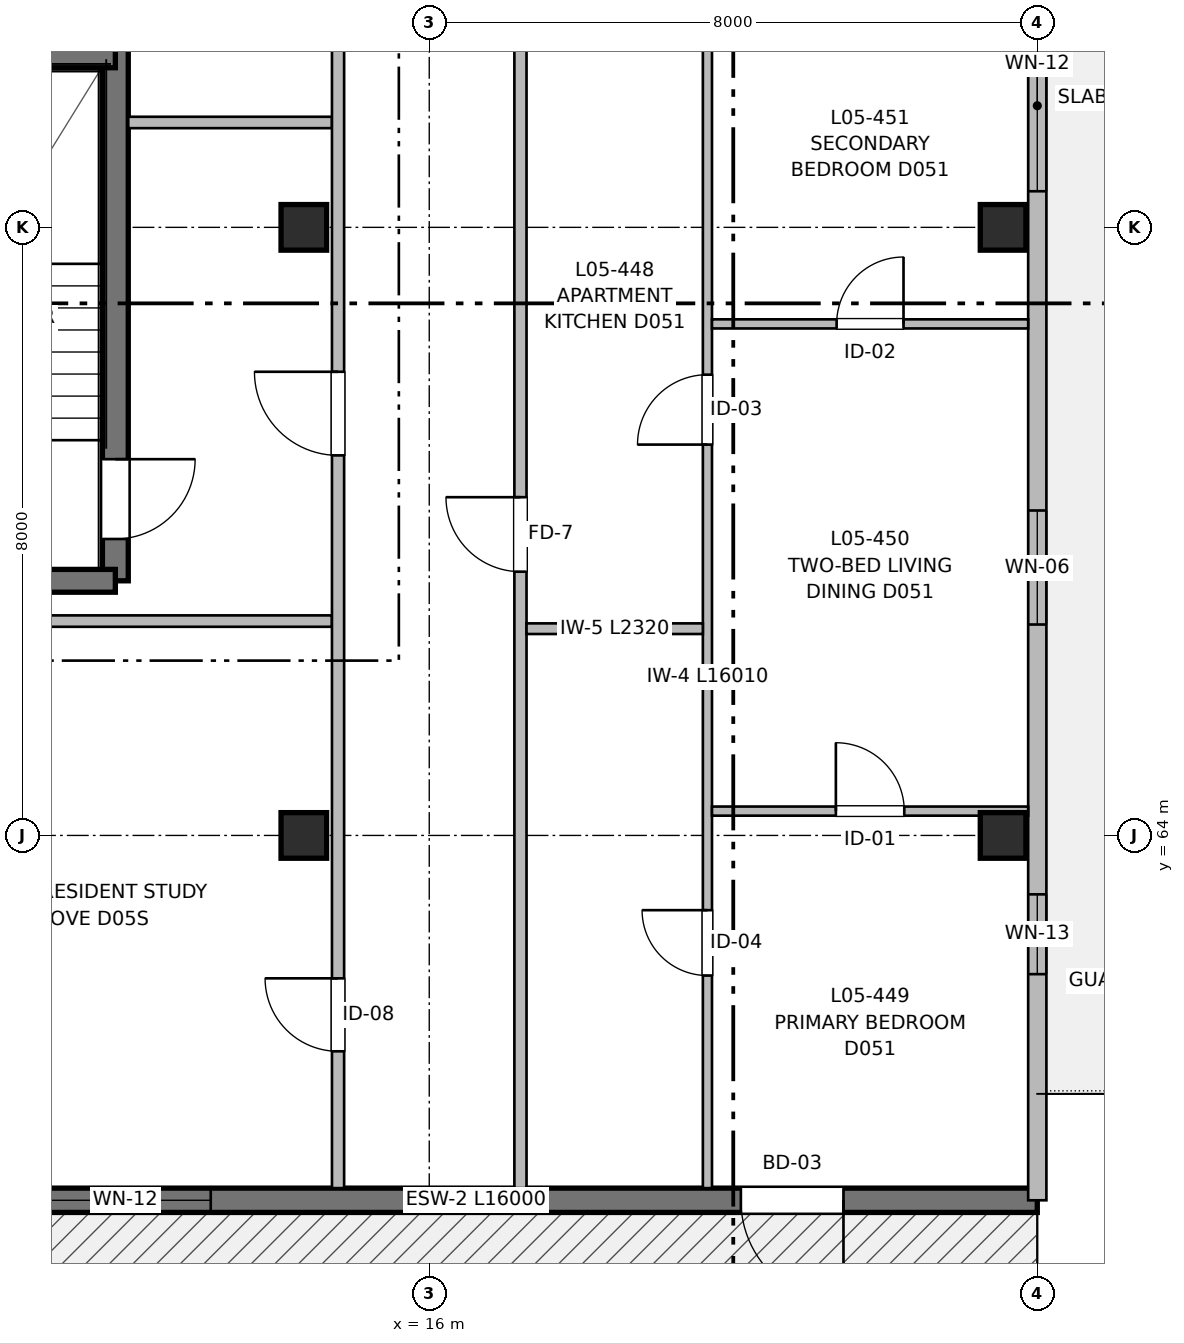
"""IFC4 building model, lengths in metres.
Left out: names, types, materials, properties, quantities, classifications, styles, units other than length and angle.
Written with IfcOpenShell. Run it as: python <this file> out.ifc"""

import sys

from ifc_helpers import new_model, si_unit, direction, frame, frame_2d, origin, origin_2d, place, context, subcontext, project, spatial, rectangle, extrude, element, fill, save


model = new_model("IFC4")
c1 = context("Model", 3, precision=1e-05, world=origin(), true_north=direction((0.0, 1.0)))
c2 = subcontext(c1, "Body", "Model", "MODEL_VIEW")
j1 = project(units=[si_unit("LENGTHUNIT", "METRE"), si_unit("PLANEANGLEUNIT", "RADIAN")], contexts=[c1])
p1 = place(None, origin())
s1 = spatial("IfcSite", under=j1, at=p1, CompositionType="ELEMENT")
p2 = place(p1, origin())
s2 = spatial("IfcBuilding", under=s1, at=p2, CompositionType="ELEMENT")
p3 = place(p2, frame((0.0, 0.0, 16.96)))
s3 = spatial("IfcBuildingStorey", under=s2, at=p3, CompositionType="ELEMENT", Elevation=16.96)
for number, where, z_axis, x_axis in (
    (1, (14.35, 64.0, 0.0), (0.0, 0.0, 1.0), (1.0, 0.0, 0.0)),
    (2, (14.35, 72.0, 0.0), (0.0, 0.0, 1.0), (1.0, 0.0, 0.0)),
    (3, (23.55, 64.0, 0.0), (0.0, 0.0, 1.0), (1.0, 0.0, 0.0)),
    (4, (23.55, 72.0, 0.0), (0.0, 0.0, 1.0), (1.0, 0.0, 0.0)),
):
    element("IfcColumn", number, at=place(p3, frame(where, z_axis=z_axis, x_axis=x_axis)), inside=s3, PredefinedType="COLUMN", context=c2, shape_type="SweptSolid", body=[
        extrude(rectangle(XDim=0.6, YDim=0.6, at=origin_2d()), origin(), (0.0, 0.0, 1.0), 3.2),
    ])
p4 = place(p3, frame((11.87, 79.8, 0.0), z_axis=(0.0, 0.0, 1.0), x_axis=(0.0, -1.0, 0.0)))
e5 = element("IfcWall", 5, at=p4, inside=s3, PredefinedType="SHEAR", context=c2, shape_type="SweptSolid", body=[
    extrude(rectangle(XDim=12.45, YDim=0.34, at=frame_2d((6.225, 0.0))), origin(), (0.0, 0.0, 1.0), 3.2),
])
p5 = place(p4, frame((10.85, 0.0, 0.0)))
e6 = element("IfcOpeningElement", 6, at=p5, cuts=e5, PredefinedType="OPENING", context=c2, shape_type="SweptSolid", body=[
    extrude(rectangle(XDim=1.05, YDim=2.15, at=frame_2d((0.525, 1.075))), frame((0.0, 0.18, 0.0), z_axis=(0.0, -1.0, 0.0), x_axis=(1.0, 0.0, 0.0)), (0.0, 0.0, 1.0), 0.36),
])
p6 = place(p3, frame((11.87, 67.35, 0.0), z_axis=(0.0, 0.0, 1.0), x_axis=(-1.0, 0.0, 0.0)))
e7 = element("IfcWall", 7, at=p6, inside=s3, PredefinedType="SHEAR", context=c2, shape_type="SweptSolid", body=[
    extrude(rectangle(XDim=3.41, YDim=0.3, at=frame_2d((1.705, 0.0))), origin(), (0.0, 0.0, 1.0), 3.2),
])
p7 = place(p3, frame((8.46, 74.24, 0.0), z_axis=(0.0, 0.0, 1.0), x_axis=(1.0, 0.0, 0.0)))
e8 = element("IfcWall", 8, at=p7, inside=s3, PredefinedType="SHEAR", context=c2, shape_type="SweptSolid", body=[
    extrude(rectangle(XDim=3.41, YDim=0.28, at=frame_2d((1.705, 0.0))), origin(), (0.0, 0.0, 1.0), 3.2),
])
p8 = place(p3, frame((24.0, 59.2, 0.0), z_axis=(0.0, 0.0, 1.0), x_axis=(-1.0, 0.0, 0.0)))
e9 = element("IfcWall", 9, at=p8, inside=s3, PredefinedType="SHEAR", context=c2, shape_type="SweptSolid", body=[
    extrude(rectangle(XDim=16.0, YDim=0.32, at=frame_2d((8.0, 0.0))), origin(), (0.0, 0.0, 1.0), 2.98),
])
p9 = place(p8, frame((2.55, 0.0, 0.0)))
e10 = element("IfcOpeningElement", 10, at=p9, cuts=e9, PredefinedType="OPENING", context=c2, shape_type="SweptSolid", body=[
    extrude(rectangle(XDim=1.35, YDim=2.2, at=frame_2d((0.675, 1.1))), frame((0.0, 0.17, 0.0), z_axis=(0.0, -1.0, 0.0), x_axis=(1.0, 0.0, 0.0)), (0.0, 0.0, 1.0), 0.34),
])
p10 = place(p8, frame((10.875, 0.0, 0.72)))
e11 = element("IfcOpeningElement", 11, at=p10, cuts=e9, PredefinedType="OPENING", context=c2, shape_type="SweptSolid", body=[
    extrude(rectangle(XDim=2.25, YDim=1.5, at=frame_2d((1.125, 0.75))), frame((0.0, 0.17, 0.0), z_axis=(0.0, -1.0, 0.0), x_axis=(1.0, 0.0, 0.0)), (0.0, 0.0, 1.0), 0.34),
])
p11 = place(p3, frame((24.0, 88.0, 0.0), z_axis=(0.0, 0.0, 1.0), x_axis=(0.0, -1.0, 0.0)))
e12 = element("IfcWall", 12, at=p11, inside=s3, PredefinedType="SOLIDWALL", context=c2, shape_type="SweptSolid", body=[
    extrude(rectangle(XDim=28.8, YDim=0.24, at=frame_2d((14.4, 0.0))), origin(), (0.0, 0.0, 1.0), 2.98),
])
p12 = place(p11, frame((4.2, 0.0, 0.0)))
e13 = element("IfcOpeningElement", 13, at=p12, cuts=e12, PredefinedType="OPENING", context=c2, shape_type="SweptSolid", body=[
    extrude(rectangle(XDim=1.2, YDim=2.2, at=frame_2d((0.6, 1.1))), frame((0.0, 0.13, 0.0), z_axis=(0.0, -1.0, 0.0), x_axis=(1.0, 0.0, 0.0)), (0.0, 0.0, 1.0), 0.26),
])
p13 = place(p11, frame((6.1, 0.0, 0.62)))
e14 = element("IfcOpeningElement", 14, at=p13, cuts=e12, PredefinedType="OPENING", context=c2, shape_type="SweptSolid", body=[
    extrude(rectangle(XDim=1.1, YDim=1.6, at=frame_2d((0.55, 0.8))), frame((0.0, 0.13, 0.0), z_axis=(0.0, -1.0, 0.0), x_axis=(1.0, 0.0, 0.0)), (0.0, 0.0, 1.0), 0.26),
])
p14 = place(p11, frame((13.275, 0.0, 0.72)))
e15 = element("IfcOpeningElement", 15, at=p14, cuts=e12, PredefinedType="OPENING", context=c2, shape_type="SweptSolid", body=[
    extrude(rectangle(XDim=2.25, YDim=1.5, at=frame_2d((1.125, 0.75))), frame((0.0, 0.13, 0.0), z_axis=(0.0, -1.0, 0.0), x_axis=(1.0, 0.0, 0.0)), (0.0, 0.0, 1.0), 0.26),
])
p15 = place(p11, frame((24.775, 0.0, 0.9)))
e16 = element("IfcOpeningElement", 16, at=p15, cuts=e12, PredefinedType="OPENING", context=c2, shape_type="SweptSolid", body=[
    extrude(rectangle(XDim=1.05, YDim=1.15, at=frame_2d((0.525, 0.575))), frame((0.0, 0.13, 0.0), z_axis=(0.0, -1.0, 0.0), x_axis=(1.0, 0.0, 0.0)), (0.0, 0.0, 1.0), 0.26),
])
p16 = place(p11, frame((19.725, 0.0, 0.82)))
e17 = element("IfcOpeningElement", 17, at=p16, cuts=e12, PredefinedType="OPENING", context=c2, shape_type="SweptSolid", body=[
    extrude(rectangle(XDim=1.5, YDim=1.4, at=frame_2d((0.75, 0.7))), frame((0.0, 0.13, 0.0), z_axis=(0.0, -1.0, 0.0), x_axis=(1.0, 0.0, 0.0)), (0.0, 0.0, 1.0), 0.26),
])
p17 = place(p11, frame((9.255, 0.0, 0.82)))
e18 = element("IfcOpeningElement", 18, at=p17, cuts=e12, PredefinedType="OPENING", context=c2, shape_type="SweptSolid", body=[
    extrude(rectangle(XDim=1.5, YDim=1.4, at=frame_2d((0.75, 0.7))), frame((0.0, 0.13, 0.0), z_axis=(0.0, -1.0, 0.0), x_axis=(1.0, 0.0, 0.0)), (0.0, 0.0, 1.0), 0.26),
])
p18 = place(p3, frame((8.12, 66.82, 0.0), z_axis=(0.0, 0.0, 1.0), x_axis=(1.0, 0.0, 0.0)))
e19 = element("IfcWall", 19, at=p18, inside=s3, PredefinedType="PARTITIONING", context=c2, shape_type="SweptSolid", body=[
    extrude(rectangle(XDim=6.6, YDim=0.15, at=frame_2d((3.3, 0.0))), origin(), (0.0, 0.0, 1.0), 2.935),
])
p19 = place(p3, frame((12.04, 73.38, 0.0), z_axis=(0.0, 0.0, 1.0), x_axis=(1.0, 0.0, 0.0)))
e20 = element("IfcWall", 20, at=p19, inside=s3, PredefinedType="PARTITIONING", context=c2, shape_type="SweptSolid", body=[
    extrude(rectangle(XDim=2.68, YDim=0.15, at=frame_2d((1.34, 0.0))), origin(), (0.0, 0.0, 1.0), 2.935),
])
p20 = place(p3, frame((14.8, 59.36, 0.0), z_axis=(0.0, 0.0, 1.0), x_axis=(0.0, 1.0, 0.0)))
e21 = element("IfcWall", 21, at=p20, inside=s3, PredefinedType="PARTITIONING", context=c2, shape_type="SweptSolid", body=[
    extrude(rectangle(XDim=47.44, YDim=0.16, at=frame_2d((23.72, 0.0))), origin(), (0.0, 0.0, 1.0), 2.935),
])
p21 = place(p20, frame((9.64, 0.0, 0.0)))
e22 = element("IfcOpeningElement", 22, at=p21, cuts=e21, PredefinedType="OPENING", context=c2, shape_type="SweptSolid", body=[
    extrude(rectangle(XDim=1.1, YDim=2.15, at=frame_2d((0.55, 1.075))), frame((0.0, 0.09, 0.0), z_axis=(0.0, -1.0, 0.0), x_axis=(1.0, 0.0, 0.0)), (0.0, 0.0, 1.0), 0.18),
])
p22 = place(p20, frame((16.04, 0.0, 0.0)))
e23 = element("IfcOpeningElement", 23, at=p22, cuts=e21, PredefinedType="OPENING", context=c2, shape_type="SweptSolid", body=[
    extrude(rectangle(XDim=1.6, YDim=2.15, at=frame_2d((0.8, 1.075))), frame((0.0, 0.09, 0.0), z_axis=(0.0, -1.0, 0.0), x_axis=(1.0, 0.0, 0.0)), (0.0, 0.0, 1.0), 0.18),
])
p23 = place(p20, frame((1.8, 0.0, 0.0)))
e24 = element("IfcOpeningElement", 24, at=p23, cuts=e21, PredefinedType="OPENING", context=c2, shape_type="SweptSolid", body=[
    extrude(rectangle(XDim=0.96, YDim=2.15, at=frame_2d((0.48, 1.075))), frame((0.0, 0.09, 0.0), z_axis=(0.0, -1.0, 0.0), x_axis=(1.0, 0.0, 0.0)), (0.0, 0.0, 1.0), 0.18),
])
p24 = place(p20, frame((29.445, 0.0, 0.0)))
e25 = element("IfcOpeningElement", 25, at=p24, cuts=e21, PredefinedType="OPENING", context=c2, shape_type="SweptSolid", body=[
    extrude(rectangle(XDim=0.98, YDim=2.15, at=frame_2d((0.49, 1.075))), frame((0.0, 0.09, 0.0), z_axis=(0.0, -1.0, 0.0), x_axis=(1.0, 0.0, 0.0)), (0.0, 0.0, 1.0), 0.18),
])
p25 = place(p20, frame((38.055, 0.0, 0.0)))
e26 = element("IfcOpeningElement", 26, at=p25, cuts=e21, PredefinedType="OPENING", context=c2, shape_type="SweptSolid", body=[
    extrude(rectangle(XDim=0.98, YDim=2.15, at=frame_2d((0.49, 1.075))), frame((0.0, 0.09, 0.0), z_axis=(0.0, -1.0, 0.0), x_axis=(1.0, 0.0, 0.0)), (0.0, 0.0, 1.0), 0.18),
])
p26 = place(p3, frame((17.2, 59.36, 0.0), z_axis=(0.0, 0.0, 1.0), x_axis=(0.0, 1.0, 0.0)))
e27 = element("IfcWall", 27, at=p26, inside=s3, PredefinedType="PARTITIONING", context=c2, shape_type="SweptSolid", body=[
    extrude(rectangle(XDim=47.44, YDim=0.16, at=frame_2d((23.72, 0.0))), origin(), (0.0, 0.0, 1.0), 2.935),
])
p27 = place(p26, frame((8.11, 0.0, 0.0)))
e28 = element("IfcOpeningElement", 28, at=p27, cuts=e27, PredefinedType="OPENING", context=c2, shape_type="SweptSolid", body=[
    extrude(rectangle(XDim=0.98, YDim=2.15, at=frame_2d((0.49, 1.075))), frame((0.0, 0.09, 0.0), z_axis=(0.0, -1.0, 0.0), x_axis=(1.0, 0.0, 0.0)), (0.0, 0.0, 1.0), 0.18),
])
p28 = place(p26, frame((24.26, 0.0, 0.0)))
e29 = element("IfcOpeningElement", 29, at=p28, cuts=e27, PredefinedType="OPENING", context=c2, shape_type="SweptSolid", body=[
    extrude(rectangle(XDim=1.02, YDim=2.15, at=frame_2d((0.51, 1.075))), frame((0.0, 0.09, 0.0), z_axis=(0.0, -1.0, 0.0), x_axis=(1.0, 0.0, 0.0)), (0.0, 0.0, 1.0), 0.18),
])
p29 = place(p26, frame((39.97, 0.0, 0.0)))
e30 = element("IfcOpeningElement", 30, at=p29, cuts=e27, PredefinedType="OPENING", context=c2, shape_type="SweptSolid", body=[
    extrude(rectangle(XDim=0.98, YDim=2.15, at=frame_2d((0.49, 1.075))), frame((0.0, 0.09, 0.0), z_axis=(0.0, -1.0, 0.0), x_axis=(1.0, 0.0, 0.0)), (0.0, 0.0, 1.0), 0.18),
])
p30 = place(p3, frame((19.66, 59.36, 0.0), z_axis=(0.0, 0.0, 1.0), x_axis=(0.0, 1.0, 0.0)))
e31 = element("IfcWall", 31, at=p30, inside=s3, PredefinedType="PARTITIONING", context=c2, shape_type="SweptSolid", body=[
    extrude(rectangle(XDim=16.01, YDim=0.12, at=frame_2d((8.005, 0.0))), origin(), (0.0, 0.0, 1.0), 2.935),
])
p31 = place(p30, frame((2.797, 0.0, 0.0)))
e32 = element("IfcOpeningElement", 32, at=p31, cuts=e31, PredefinedType="OPENING", context=c2, shape_type="SweptSolid", body=[
    extrude(rectangle(XDim=0.86, YDim=2.1, at=frame_2d((0.43, 1.05))), frame((0.0, 0.07, 0.0), z_axis=(0.0, -1.0, 0.0), x_axis=(1.0, 0.0, 0.0)), (0.0, 0.0, 1.0), 0.14),
])
p32 = place(p30, frame((9.782, 0.0, 0.0)))
e33 = element("IfcOpeningElement", 33, at=p32, cuts=e31, PredefinedType="OPENING", context=c2, shape_type="SweptSolid", body=[
    extrude(rectangle(XDim=0.92, YDim=2.1, at=frame_2d((0.46, 1.05))), frame((0.0, 0.07, 0.0), z_axis=(0.0, -1.0, 0.0), x_axis=(1.0, 0.0, 0.0)), (0.0, 0.0, 1.0), 0.14),
])
p33 = place(p3, frame((17.28, 66.72, 0.0), z_axis=(0.0, 0.0, 1.0), x_axis=(1.0, 0.0, 0.0)))
e34 = element("IfcWall", 34, at=p33, inside=s3, PredefinedType="PARTITIONING", context=c2, shape_type="SweptSolid", body=[
    extrude(rectangle(XDim=2.32, YDim=0.14, at=frame_2d((1.16, 0.0))), origin(), (0.0, 0.0, 1.0), 2.935),
])
p34 = place(p3, frame((19.72, 64.32, 0.0), z_axis=(0.0, 0.0, 1.0), x_axis=(1.0, 0.0, 0.0)))
e35 = element("IfcWall", 35, at=p34, inside=s3, PredefinedType="PARTITIONING", context=c2, shape_type="SweptSolid", body=[
    extrude(rectangle(XDim=4.16, YDim=0.12, at=frame_2d((2.08, 0.0))), origin(), (0.0, 0.0, 1.0), 2.935),
])
p35 = place(p34, frame((1.63, 0.0, 0.0)))
e36 = element("IfcOpeningElement", 36, at=p35, cuts=e35, PredefinedType="OPENING", context=c2, shape_type="SweptSolid", body=[
    extrude(rectangle(XDim=0.9, YDim=2.1, at=frame_2d((0.45, 1.05))), frame((0.0, 0.07, 0.0), z_axis=(0.0, -1.0, 0.0), x_axis=(1.0, 0.0, 0.0)), (0.0, 0.0, 1.0), 0.14),
])
p36 = place(p3, frame((19.72, 70.73, 0.0), z_axis=(0.0, 0.0, 1.0), x_axis=(1.0, 0.0, 0.0)))
e37 = element("IfcWall", 37, at=p36, inside=s3, PredefinedType="PARTITIONING", context=c2, shape_type="SweptSolid", body=[
    extrude(rectangle(XDim=4.16, YDim=0.12, at=frame_2d((2.08, 0.0))), origin(), (0.0, 0.0, 1.0), 2.935),
])
p37 = place(p36, frame((1.64, 0.0, 0.0)))
e38 = element("IfcOpeningElement", 38, at=p37, cuts=e37, PredefinedType="OPENING", context=c2, shape_type="SweptSolid", body=[
    extrude(rectangle(XDim=0.88, YDim=2.1, at=frame_2d((0.44, 1.05))), frame((0.0, 0.07, 0.0), z_axis=(0.0, -1.0, 0.0), x_axis=(1.0, 0.0, 0.0)), (0.0, 0.0, 1.0), 0.14),
])
p38 = place(p5, origin())
e39 = element("IfcDoor", 39, at=p38, inside=s3, OperationType="SINGLE_SWING_LEFT", PredefinedType="DOOR", context=c2, shape_type="SweptSolid", body=[
    extrude(rectangle(XDim=1.05, YDim=2.15, at=frame_2d((0.525, 1.075))), frame((0.0, 0.025, 0.0), z_axis=(0.0, -1.0, 0.0), x_axis=(1.0, 0.0, 0.0)), (0.0, 0.0, 1.0), 0.05),
])
fill(e6, e39)
p39 = place(p9, origin())
e40 = element("IfcDoor", 40, at=p39, inside=s3, OperationType="SINGLE_SWING_LEFT", PredefinedType="DOOR", context=c2, shape_type="SweptSolid", body=[
    extrude(rectangle(XDim=1.35, YDim=2.2, at=frame_2d((0.675, 1.1))), frame((0.0, 0.025, 0.0), z_axis=(0.0, -1.0, 0.0), x_axis=(1.0, 0.0, 0.0)), (0.0, 0.0, 1.0), 0.05),
])
fill(e10, e40)
p40 = place(p10, origin())
e41 = element("IfcWindow", 41, at=p40, inside=s3, PartitioningType="SINGLE_PANEL", PredefinedType="WINDOW", context=c2, shape_type="SweptSolid", body=[
    extrude(rectangle(XDim=2.25, YDim=1.5, at=frame_2d((1.125, 0.75))), frame((0.0, 0.03, 0.0), z_axis=(0.0, -1.0, 0.0), x_axis=(1.0, 0.0, 0.0)), (0.0, 0.0, 1.0), 0.06),
])
fill(e11, e41)
p41 = place(p14, origin())
e42 = element("IfcWindow", 42, at=p41, inside=s3, PartitioningType="SINGLE_PANEL", PredefinedType="WINDOW", context=c2, shape_type="SweptSolid", body=[
    extrude(rectangle(XDim=2.25, YDim=1.5, at=frame_2d((1.125, 0.75))), frame((0.0, 0.03, 0.0), z_axis=(0.0, -1.0, 0.0), x_axis=(1.0, 0.0, 0.0)), (0.0, 0.0, 1.0), 0.06),
])
fill(e15, e42)
p42 = place(p15, origin())
e43 = element("IfcWindow", 43, at=p42, inside=s3, PartitioningType="SINGLE_PANEL", PredefinedType="WINDOW", context=c2, shape_type="SweptSolid", body=[
    extrude(rectangle(XDim=1.05, YDim=1.15, at=frame_2d((0.525, 0.575))), frame((0.0, 0.03, 0.0), z_axis=(0.0, -1.0, 0.0), x_axis=(1.0, 0.0, 0.0)), (0.0, 0.0, 1.0), 0.06),
])
fill(e16, e43)
p43 = place(p21, origin())
e44 = element("IfcDoor", 44, at=p43, inside=s3, OperationType="SINGLE_SWING_RIGHT", PredefinedType="DOOR", context=c2, shape_type="SweptSolid", body=[
    extrude(rectangle(XDim=1.1, YDim=2.15, at=frame_2d((0.55, 1.075))), frame((0.0, 0.025, 0.0), z_axis=(0.0, -1.0, 0.0), x_axis=(1.0, 0.0, 0.0)), (0.0, 0.0, 1.0), 0.05),
])
fill(e22, e44)
p44 = place(p31, origin())
e45 = element("IfcDoor", 45, at=p44, inside=s3, OperationType="SINGLE_SWING_RIGHT", PredefinedType="DOOR", context=c2, shape_type="SweptSolid", body=[
    extrude(rectangle(XDim=0.86, YDim=2.1, at=frame_2d((0.43, 1.05))), frame((0.0, 0.025, 0.0), z_axis=(0.0, -1.0, 0.0), x_axis=(1.0, 0.0, 0.0)), (0.0, 0.0, 1.0), 0.05),
])
fill(e32, e45)
p45 = place(p32, origin())
e46 = element("IfcDoor", 46, at=p45, inside=s3, OperationType="SINGLE_SWING_LEFT", PredefinedType="DOOR", context=c2, shape_type="SweptSolid", body=[
    extrude(rectangle(XDim=0.92, YDim=2.1, at=frame_2d((0.46, 1.05))), frame((0.0, 0.025, 0.0), z_axis=(0.0, -1.0, 0.0), x_axis=(1.0, 0.0, 0.0)), (0.0, 0.0, 1.0), 0.05),
])
fill(e33, e46)
p46 = place(p27, origin())
e47 = element("IfcDoor", 47, at=p46, inside=s3, OperationType="SINGLE_SWING_RIGHT", PredefinedType="DOOR", context=c2, shape_type="SweptSolid", body=[
    extrude(rectangle(XDim=0.98, YDim=2.15, at=frame_2d((0.49, 1.075))), frame((0.0, 0.025, 0.0), z_axis=(0.0, -1.0, 0.0), x_axis=(1.0, 0.0, 0.0)), (0.0, 0.0, 1.0), 0.05),
])
fill(e28, e47)
p47 = place(p35, origin())
e48 = element("IfcDoor", 48, at=p47, inside=s3, OperationType="SINGLE_SWING_LEFT", PredefinedType="DOOR", context=c2, shape_type="SweptSolid", body=[
    extrude(rectangle(XDim=0.9, YDim=2.1, at=frame_2d((0.45, 1.05))), frame((0.0, 0.025, 0.0), z_axis=(0.0, -1.0, 0.0), x_axis=(1.0, 0.0, 0.0)), (0.0, 0.0, 1.0), 0.05),
])
fill(e36, e48)
p48 = place(p37, origin())
e49 = element("IfcDoor", 49, at=p48, inside=s3, OperationType="SINGLE_SWING_RIGHT", PredefinedType="DOOR", context=c2, shape_type="SweptSolid", body=[
    extrude(rectangle(XDim=0.88, YDim=2.1, at=frame_2d((0.44, 1.05))), frame((0.0, 0.025, 0.0), z_axis=(0.0, -1.0, 0.0), x_axis=(1.0, 0.0, 0.0)), (0.0, 0.0, 1.0), 0.05),
])
fill(e38, e49)
p49 = place(p23, origin())
e50 = element("IfcDoor", 50, at=p49, inside=s3, OperationType="SINGLE_SWING_RIGHT", PredefinedType="DOOR", context=c2, shape_type="SweptSolid", body=[
    extrude(rectangle(XDim=0.96, YDim=2.15, at=frame_2d((0.48, 1.075))), frame((0.0, 0.025, 0.0), z_axis=(0.0, -1.0, 0.0), x_axis=(1.0, 0.0, 0.0)), (0.0, 0.0, 1.0), 0.05),
])
fill(e24, e50)
p50 = place(p16, origin())
e51 = element("IfcWindow", 51, at=p50, inside=s3, PartitioningType="SINGLE_PANEL", PredefinedType="WINDOW", context=c2, shape_type="SweptSolid", body=[
    extrude(rectangle(XDim=1.5, YDim=1.4, at=frame_2d((0.75, 0.7))), frame((0.0, 0.03, 0.0), z_axis=(0.0, -1.0, 0.0), x_axis=(1.0, 0.0, 0.0)), (0.0, 0.0, 1.0), 0.06),
])
fill(e17, e51)
save(model, sys.argv[1])
